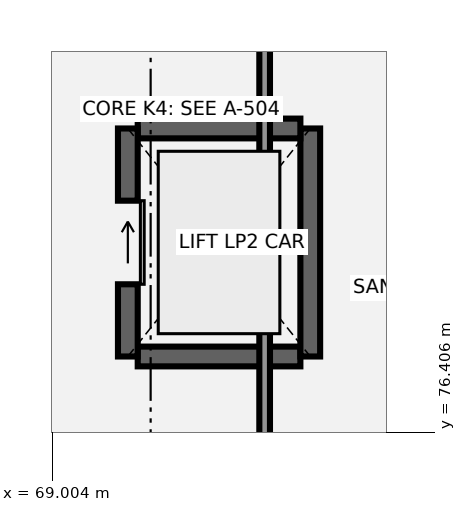
"""IFC4 building model, lengths in metres.
Left out: names, types, materials, properties, quantities, classifications, styles, units other than length and angle.
Written with IfcOpenShell. Run it as: python <this file> out.ifc"""

import sys

from ifc_helpers import new_model, si_unit, direction, frame, frame_2d, origin, place, context, subcontext, project, spatial, rectangle, extrude, element, fill, save


model = new_model("IFC4")
c1 = context("Model", 3, precision=1e-05, world=origin(), true_north=direction((0.0, 1.0)))
c2 = subcontext(c1, "Body", "Model", "MODEL_VIEW")
j1 = project(units=[si_unit("LENGTHUNIT", "METRE"), si_unit("PLANEANGLEUNIT", "RADIAN")], contexts=[c1])
p1 = place(None, origin())
s1 = spatial("IfcSite", under=j1, at=p1, CompositionType="ELEMENT")
p2 = place(p1, origin())
s2 = spatial("IfcBuilding", under=s1, at=p2, CompositionType="ELEMENT")
p3 = place(p2, frame((0.0, 0.0, -4.8)))
s3 = spatial("IfcBuildingStorey", under=s2, at=p3, CompositionType="ELEMENT", Elevation=-4.8)
p4 = place(p3, frame((70.13, 77.4, 0.0), z_axis=(0.0, 0.0, 1.0), x_axis=(1.0, 0.0, 0.0)))
e1 = element("IfcWall", 1, at=p4, inside=s3, PredefinedType="SHEAR", context=c2, shape_type="SweptSolid", body=[
    extrude(rectangle(XDim=2.14, YDim=0.26, at=frame_2d((1.07, 0.0))), origin(), (0.0, 0.0, 1.0), 4.5),
])
p5 = place(p3, frame((72.4, 77.4, 0.0), z_axis=(0.0, 0.0, 1.0), x_axis=(0.0, 1.0, 0.0)))
e2 = element("IfcWall", 2, at=p5, inside=s3, PredefinedType="SHEAR", context=c2, shape_type="SweptSolid", body=[
    extrude(rectangle(XDim=3.0, YDim=0.26, at=frame_2d((1.5, 0.0))), origin(), (0.0, 0.0, 1.0), 4.5),
])
p6 = place(p3, frame((72.27, 80.4, 0.0), z_axis=(0.0, 0.0, 1.0), x_axis=(-1.0, 0.0, 0.0)))
e3 = element("IfcWall", 3, at=p6, inside=s3, PredefinedType="SHEAR", context=c2, shape_type="SweptSolid", body=[
    extrude(rectangle(XDim=2.14, YDim=0.26, at=frame_2d((1.07, 0.0))), origin(), (0.0, 0.0, 1.0), 4.5),
])
p7 = place(p3, frame((70.0, 80.4, 0.0), z_axis=(0.0, 0.0, 1.0), x_axis=(0.0, -1.0, 0.0)))
e4 = element("IfcWall", 4, at=p7, inside=s3, PredefinedType="SHEAR", context=c2, shape_type="SweptSolid", body=[
    extrude(rectangle(XDim=3.0, YDim=0.26, at=frame_2d((1.5, 0.0))), origin(), (0.0, 0.0, 1.0), 4.5),
])
p8 = place(p7, frame((0.95, 0.0, 0.0)))
e5 = element("IfcOpeningElement", 5, at=p8, cuts=e4, PredefinedType="OPENING", context=c2, shape_type="SweptSolid", body=[
    extrude(rectangle(XDim=1.1, YDim=2.1, at=frame_2d((0.55, 1.05))), frame((0.0, 0.14, 0.0), z_axis=(0.0, -1.0, 0.0), x_axis=(1.0, 0.0, 0.0)), (0.0, 0.0, 1.0), 0.28),
])
p9 = place(p3, frame((71.8, 75.072, 0.0), z_axis=(0.0, 0.0, 1.0), x_axis=(0.0, 1.0, 0.0)))
e6 = element("IfcWall", 6, at=p9, inside=s3, PredefinedType="PARTITIONING", context=c2, shape_type="SweptSolid", body=[
    extrude(rectangle(XDim=6.426, YDim=0.14, at=frame_2d((3.213, 0.0))), origin(), (0.0, 0.0, 1.0), 4.44),
])
p10 = place(p8, origin())
e7 = element("IfcDoor", 7, at=p10, inside=s3, OperationType="SLIDING_TO_LEFT", PredefinedType="DOOR", context=c2, shape_type="SweptSolid", body=[
    extrude(rectangle(XDim=1.1, YDim=2.1, at=frame_2d((0.55, 1.05))), frame((0.0, 0.025, 0.0), z_axis=(0.0, -1.0, 0.0), x_axis=(1.0, 0.0, 0.0)), (0.0, 0.0, 1.0), 0.05),
])
fill(e5, e7)
save(model, sys.argv[1])
